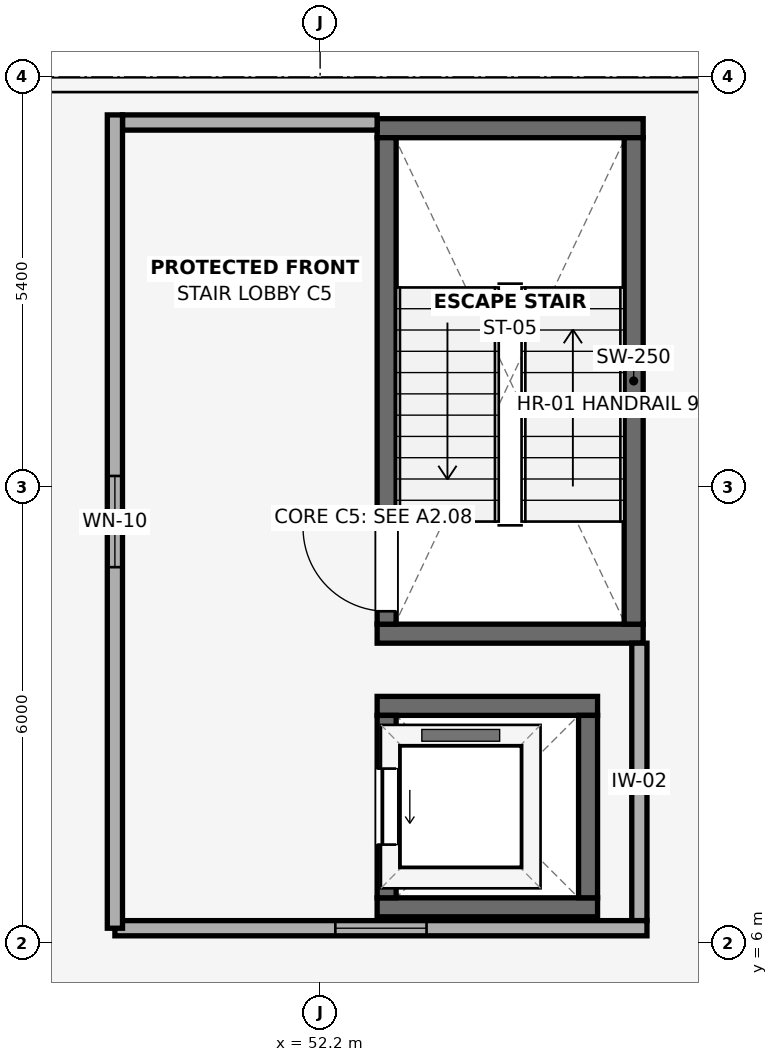
"""IFC4 building model, lengths in metres.
Left out: names, types, materials, properties, quantities, classifications, styles, units other than length and angle.
Written with IfcOpenShell. Run it as: python <this file> out.ifc"""

import sys

from ifc_helpers import new_model, si_unit, direction, frame, frame_2d, origin, place, context, subcontext, project, spatial, rectangle, extrude, element, fill, save


model = new_model("IFC4")
c1 = context("Model", 3, precision=1e-05, world=origin(), true_north=direction((0.0, 1.0)))
c2 = subcontext(c1, "Body", "Model", "MODEL_VIEW")
j1 = project(units=[si_unit("LENGTHUNIT", "METRE"), si_unit("PLANEANGLEUNIT", "RADIAN")], contexts=[c1])
p1 = place(None, origin())
s1 = spatial("IfcSite", under=j1, at=p1, CompositionType="ELEMENT")
p2 = place(p1, origin())
s2 = spatial("IfcBuilding", under=s1, at=p2, CompositionType="ELEMENT")
p3 = place(p2, frame((0.0, 0.0, 9.0)))
s3 = spatial("IfcBuildingStorey", under=s2, at=p3, CompositionType="ELEMENT", Elevation=9.0)
for number, where, z_axis, x_axis in (
    (1, (52.95, 10.075, 0.0), (0.0, 0.0, 1.0), (1.0, 0.0, 0.0)),
    (2, (52.95, 16.725, 0.0), (0.0, 0.0, 1.0), (1.0, 0.0, 0.0)),
):
    element("IfcWall", number, at=place(p3, frame(where, z_axis=z_axis, x_axis=x_axis)), inside=s3, PredefinedType="SHEAR", context=c2, shape_type="SweptSolid", body=[
        extrude(rectangle(XDim=3.5, YDim=0.25, at=frame_2d((1.75, 0.0))), origin(), (0.0, 0.0, 1.0), 4.2),
    ])
p4 = place(p3, frame((53.075, 10.2, 0.0), z_axis=(0.0, 0.0, 1.0), x_axis=(0.0, 1.0, 0.0)))
e3 = element("IfcWall", 3, at=p4, inside=s3, PredefinedType="SHEAR", context=c2, shape_type="SweptSolid", body=[
    extrude(rectangle(XDim=6.4, YDim=0.25, at=frame_2d((3.2, 0.0))), origin(), (0.0, 0.0, 1.0), 4.2),
])
p5 = place(p4, frame((0.17, 0.0, 0.0)))
e4 = element("IfcOpeningElement", 4, at=p5, cuts=e3, PredefinedType="OPENING", context=c2, shape_type="SweptSolid", body=[
    extrude(rectangle(XDim=1.1, YDim=2.15, at=frame_2d((0.55, 1.075))), frame((0.0, 0.14, 0.0), z_axis=(0.0, -1.0, 0.0), x_axis=(1.0, 0.0, 0.0)), (0.0, 0.0, 1.0), 0.28),
])
p6 = place(p3, frame((56.325, 10.2, 0.0), z_axis=(0.0, 0.0, 1.0), x_axis=(0.0, 1.0, 0.0)))
e5 = element("IfcWall", 5, at=p6, inside=s3, PredefinedType="SHEAR", context=c2, shape_type="SweptSolid", body=[
    extrude(rectangle(XDim=6.4, YDim=0.25, at=frame_2d((3.2, 0.0))), origin(), (0.0, 0.0, 1.0), 4.2),
])
for number, where, z_axis, x_axis in (
    (6, (52.95, 6.475, 0.0), (0.0, 0.0, 1.0), (1.0, 0.0, 0.0)),
    (7, (52.95, 9.125, 0.0), (0.0, 0.0, 1.0), (1.0, 0.0, 0.0)),
):
    element("IfcWall", number, at=place(p3, frame(where, z_axis=z_axis, x_axis=x_axis)), inside=s3, PredefinedType="SHEAR", context=c2, shape_type="SweptSolid", body=[
        extrude(rectangle(XDim=2.9, YDim=0.25, at=frame_2d((1.45, 0.0))), origin(), (0.0, 0.0, 1.0), 4.2),
    ])
p7 = place(p3, frame((53.075, 6.6, 0.0), z_axis=(0.0, 0.0, 1.0), x_axis=(0.0, 1.0, 0.0)))
e8 = element("IfcWall", 8, at=p7, inside=s3, PredefinedType="SHEAR", context=c2, shape_type="SweptSolid", body=[
    extrude(rectangle(XDim=2.4, YDim=0.25, at=frame_2d((1.2, 0.0))), origin(), (0.0, 0.0, 1.0), 4.2),
])
p8 = place(p7, frame((0.7, 0.0, 0.0)))
e9 = element("IfcOpeningElement", 9, at=p8, cuts=e8, PredefinedType="OPENING", context=c2, shape_type="SweptSolid", body=[
    extrude(rectangle(XDim=1.0, YDim=2.15, at=frame_2d((0.5, 1.075))), frame((0.0, 0.14, 0.0), z_axis=(0.0, -1.0, 0.0), x_axis=(1.0, 0.0, 0.0)), (0.0, 0.0, 1.0), 0.28),
])
p9 = place(p3, frame((55.725, 6.6, 0.0), z_axis=(0.0, 0.0, 1.0), x_axis=(0.0, 1.0, 0.0)))
e10 = element("IfcWall", 10, at=p9, inside=s3, PredefinedType="SHEAR", context=c2, shape_type="SweptSolid", body=[
    extrude(rectangle(XDim=2.4, YDim=0.25, at=frame_2d((1.2, 0.0))), origin(), (0.0, 0.0, 1.0), 4.2),
])
p10 = place(p3, frame((49.6, 16.8, 0.0), z_axis=(0.0, 0.0, 1.0), x_axis=(1.0, 0.0, 0.0)))
e11 = element("IfcWall", 11, at=p10, inside=s3, PredefinedType="PARTITIONING", context=c2, shape_type="SweptSolid", body=[
    extrude(rectangle(XDim=3.35, YDim=0.2, at=frame_2d((1.675, 0.0))), origin(), (0.0, 0.0, 1.0), 4.2),
])
p11 = place(p3, frame((56.4, 6.3, 0.0), z_axis=(0.0, 0.0, 1.0), x_axis=(0.0, 1.0, 0.0)))
e12 = element("IfcWall", 12, at=p11, inside=s3, PredefinedType="PARTITIONING", context=c2, shape_type="SweptSolid", body=[
    extrude(rectangle(XDim=3.65, YDim=0.2, at=frame_2d((1.825, 0.0))), origin(), (0.0, 0.0, 1.0), 4.2),
])
p12 = place(p3, frame((49.5, 6.2, 0.0), z_axis=(0.0, 0.0, 1.0), x_axis=(1.0, 0.0, 0.0)))
e13 = element("IfcWall", 13, at=p12, inside=s3, PredefinedType="PARTITIONING", context=c2, shape_type="SweptSolid", body=[
    extrude(rectangle(XDim=7.0, YDim=0.2, at=frame_2d((3.5, 0.0))), origin(), (0.0, 0.0, 1.0), 4.2),
])
p13 = place(p12, frame((2.9, 0.0, 1.1)))
e14 = element("IfcOpeningElement", 14, at=p13, cuts=e13, PredefinedType="OPENING", context=c2, shape_type="SweptSolid", body=[
    extrude(rectangle(XDim=1.2, YDim=1.5, at=frame_2d((0.6, 0.75))), frame((0.0, 0.115, 0.0), z_axis=(0.0, -1.0, 0.0), x_axis=(1.0, 0.0, 0.0)), (0.0, 0.0, 1.0), 0.23),
])
p14 = place(p3, frame((49.5, 16.9, 0.0), z_axis=(0.0, 0.0, 1.0), x_axis=(0.0, -1.0, 0.0)))
e15 = element("IfcWall", 15, at=p14, inside=s3, PredefinedType="PARTITIONING", context=c2, shape_type="SweptSolid", body=[
    extrude(rectangle(XDim=10.7, YDim=0.2, at=frame_2d((5.35, 0.0))), origin(), (0.0, 0.0, 1.0), 4.2),
])
p15 = place(p14, frame((4.75, 0.0, 1.1)))
e16 = element("IfcOpeningElement", 16, at=p15, cuts=e15, PredefinedType="OPENING", context=c2, shape_type="SweptSolid", body=[
    extrude(rectangle(XDim=1.2, YDim=1.5, at=frame_2d((0.6, 0.75))), frame((0.0, 0.115, 0.0), z_axis=(0.0, -1.0, 0.0), x_axis=(1.0, 0.0, 0.0)), (0.0, 0.0, 1.0), 0.23),
])
p16 = place(p13, origin())
e17 = element("IfcWindow", 17, at=p16, inside=s3, PartitioningType="SINGLE_PANEL", PredefinedType="WINDOW", context=c2, shape_type="SweptSolid", body=[
    extrude(rectangle(XDim=1.2, YDim=1.5, at=frame_2d((0.6, 0.75))), frame((0.0, 0.03, 0.0), z_axis=(0.0, -1.0, 0.0), x_axis=(1.0, 0.0, 0.0)), (0.0, 0.0, 1.0), 0.06),
])
fill(e14, e17)
p17 = place(p15, origin())
e18 = element("IfcWindow", 18, at=p17, inside=s3, PartitioningType="SINGLE_PANEL", PredefinedType="WINDOW", context=c2, shape_type="SweptSolid", body=[
    extrude(rectangle(XDim=1.2, YDim=1.5, at=frame_2d((0.6, 0.75))), frame((0.0, 0.03, 0.0), z_axis=(0.0, -1.0, 0.0), x_axis=(1.0, 0.0, 0.0)), (0.0, 0.0, 1.0), 0.06),
])
fill(e16, e18)
p18 = place(p5, origin())
e19 = element("IfcDoor", 19, at=p18, inside=s3, OperationType="SINGLE_SWING_RIGHT", PredefinedType="DOOR", context=c2, shape_type="SweptSolid", body=[
    extrude(rectangle(XDim=1.1, YDim=2.15, at=frame_2d((0.55, 1.075))), frame((0.0, 0.025, 0.0), z_axis=(0.0, -1.0, 0.0), x_axis=(1.0, 0.0, 0.0)), (0.0, 0.0, 1.0), 0.05),
])
fill(e4, e19)
p19 = place(p8, origin())
e20 = element("IfcDoor", 20, at=p19, inside=s3, OperationType="SLIDING_TO_LEFT", PredefinedType="DOOR", context=c2, shape_type="SweptSolid", body=[
    extrude(rectangle(XDim=1.0, YDim=2.15, at=frame_2d((0.5, 1.075))), frame((0.0, 0.025, 0.0), z_axis=(0.0, -1.0, 0.0), x_axis=(1.0, 0.0, 0.0)), (0.0, 0.0, 1.0), 0.05),
])
fill(e9, e20)
save(model, sys.argv[1])
